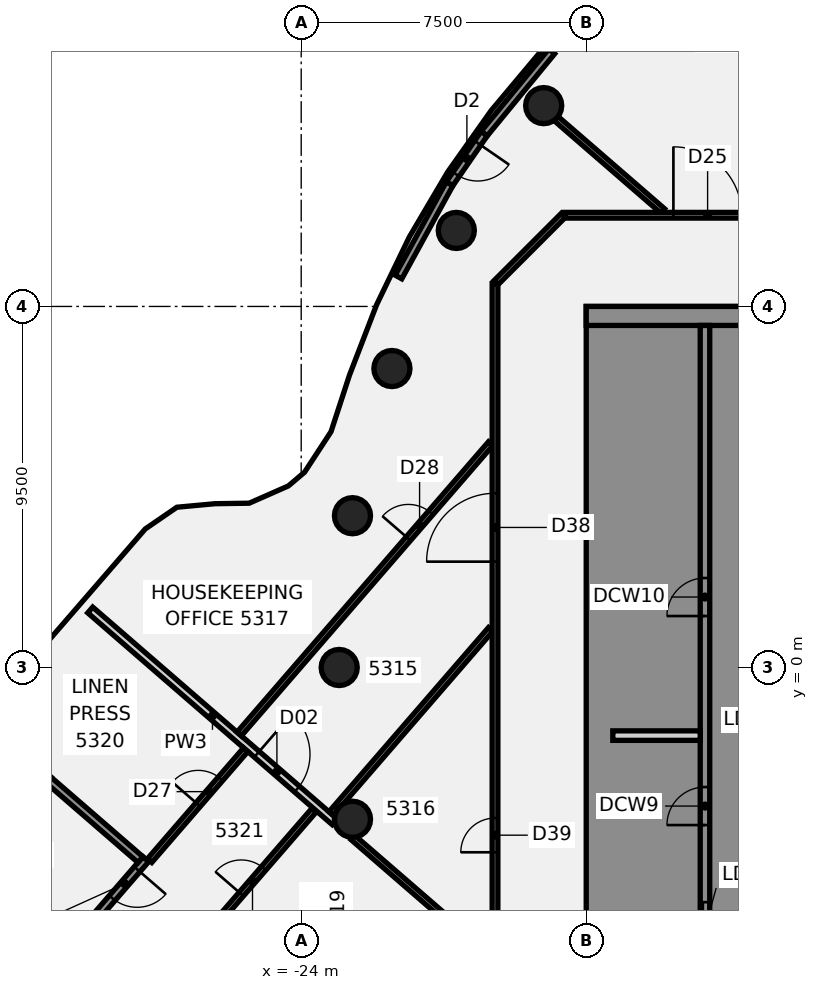
"""IFC4 building model, lengths in metres.
Left out: names, types, materials, properties, quantities, classifications, styles, units other than length and angle.
Written with IfcOpenShell. Run it as: python <this file> out.ifc"""

import sys

from ifc_helpers import new_model, si_unit, direction, frame, frame_2d, origin, origin_2d, place, context, subcontext, project, spatial, polyline, rectangle, circle, outline, extrude, element, fill, save


model = new_model("IFC4")
c1 = context("Model", 3, precision=1e-05, world=origin(), true_north=direction((0.0, 1.0)))
c2 = subcontext(c1, "Body", "Model", "MODEL_VIEW")
j1 = project(units=[si_unit("LENGTHUNIT", "METRE"), si_unit("PLANEANGLEUNIT", "RADIAN")], contexts=[c1])
p1 = place(None, origin())
s1 = spatial("IfcSite", under=j1, at=p1, CompositionType="ELEMENT")
p2 = place(p1, origin())
s2 = spatial("IfcBuilding", under=s1, at=p2, CompositionType="ELEMENT")
p3 = place(p2, frame((0.0, 0.0, 211.3)))
s3 = spatial("IfcBuildingStorey", under=s2, at=p3, CompositionType="ELEMENT", Elevation=211.3)
for number, where, z_axis, x_axis in (
    (1, (-17.619, 14.784, -0.14), (0.0, 0.0, 1.0), (1.0, 0.0, 0.0)),
    (2, (-19.919, 11.5, -0.14), (0.0, 0.0, 1.0), (1.0, 0.0, 0.0)),
    (3, (-21.613, 7.866, -0.14), (0.0, 0.0, 1.0), (1.0, 0.0, 0.0)),
    (4, (-22.651, 3.994, -0.14), (0.0, 0.0, 1.0), (1.0, 0.0, 0.0)),
    (5, (-23.0, 0.0, -0.14), (0.0, 0.0, 1.0), (1.0, 0.0, 0.0)),
    (6, (-22.651, -3.994, -0.14), (0.0, 0.0, 1.0), (1.0, 0.0, 0.0)),
):
    element("IfcColumn", number, at=place(p3, frame(where, z_axis=z_axis, x_axis=x_axis)), inside=s3, PredefinedType="COLUMN", context=c2, shape_type="SweptSolid", body=[
        extrude(circle(Radius=0.475, at=origin_2d()), origin(), (0.0, 0.0, 1.0), 3.56),
    ])
p4 = place(p3, frame((-29.552, 1.513, 0.0), z_axis=(0.0, 0.0, 1.0), x_axis=(0.755865087151, -0.65472740131, 0.0)))
e7 = element("IfcWall", 7, at=p4, inside=s3, PredefinedType="PARTITIONING", context=c2, shape_type="SweptSolid", body=[
    extrude(rectangle(XDim=8.511, YDim=0.2, at=frame_2d((4.256, 0.0))), origin(), (0.0, 0.0, 1.0), 2.82),
])
p5 = place(p4, frame((5.799, 0.0, 0.0)))
e8 = element("IfcOpeningElement", 8, at=p5, cuts=e7, PredefinedType="OPENING", context=c2, shape_type="SweptSolid", body=[
    extrude(rectangle(XDim=1.4, YDim=2.1, at=frame_2d((0.7, 1.05))), frame((0.0, 0.11, 0.0), z_axis=(0.0, -1.0, 0.0), x_axis=(1.0, 0.0, 0.0)), (0.0, 0.0, 1.0), 0.22),
])
p6 = place(p3, frame((-22.638, -4.476, 0.0), z_axis=(0.0, 0.0, 1.0), x_axis=(0.755838297059, -0.654758328468, 0.0)))
e9 = element("IfcWall", 9, at=p6, inside=s3, PredefinedType="PARTITIONING", context=c2, shape_type="SweptSolid", body=[
    extrude(rectangle(XDim=4.804, YDim=0.15, at=frame_2d((2.402, 0.0))), origin(), (0.0, 0.0, 1.0), 2.824),
])
p7 = place(p3, frame((-17.295, 14.446, 0.0), z_axis=(0.0, 0.0, 1.0), x_axis=(0.755890810331, -0.654697703415, 0.0)))
e10 = element("IfcWall", 10, at=p7, inside=s3, PredefinedType="PARTITIONING", context=c2, shape_type="SweptSolid", body=[
    extrude(rectangle(XDim=3.713, YDim=0.15, at=frame_2d((1.856, 0.0))), origin(), (0.0, 0.0, 1.0), 2.824),
])
p8 = place(p3, frame((-17.065, 11.9, 0.0), z_axis=(0.0, 0.0, 1.0), x_axis=(1.0, 0.0, 0.0)))
e11 = element("IfcWall", 11, at=p8, inside=s3, PredefinedType="PARTITIONING", context=c2, shape_type="SweptSolid", body=[
    extrude(rectangle(XDim=34.165, YDim=0.15, at=frame_2d((17.083, 0.0))), origin(), (0.0, 0.0, 1.0), 2.824),
])
p9 = place(p8, frame((24.284, 0.0, 0.0)))
e12 = element("IfcOpeningElement", 12, at=p9, cuts=e11, PredefinedType="OPENING", context=c2, shape_type="SweptSolid", body=[
    extrude(rectangle(XDim=1.8, YDim=2.1, at=frame_2d((0.9, 1.05))), frame((0.0, 0.085, 0.0), z_axis=(0.0, -1.0, 0.0), x_axis=(1.0, 0.0, 0.0)), (0.0, 0.0, 1.0), 0.17),
])
p10 = place(p8, frame((9.009, 0.0, 0.0)))
e13 = element("IfcOpeningElement", 13, at=p10, cuts=e11, PredefinedType="OPENING", context=c2, shape_type="SweptSolid", body=[
    extrude(rectangle(XDim=1.8, YDim=2.1, at=frame_2d((0.9, 1.05))), frame((0.0, 0.085, 0.0), z_axis=(0.0, -1.0, 0.0), x_axis=(1.0, 0.0, 0.0)), (0.0, 0.0, 1.0), 0.17),
])
p11 = place(p8, frame((29.321, 0.0, 0.0)))
e14 = element("IfcOpeningElement", 14, at=p11, cuts=e11, PredefinedType="OPENING", context=c2, shape_type="SweptSolid", body=[
    extrude(rectangle(XDim=0.9, YDim=2.1, at=frame_2d((0.45, 1.05))), frame((0.0, 0.085, 0.0), z_axis=(0.0, -1.0, 0.0), x_axis=(1.0, 0.0, 0.0)), (0.0, 0.0, 1.0), 0.17),
])
p12 = place(p8, frame((2.859, 0.0, 0.0)))
e15 = element("IfcOpeningElement", 15, at=p12, cuts=e11, PredefinedType="OPENING", context=c2, shape_type="SweptSolid", body=[
    extrude(rectangle(XDim=1.8, YDim=2.1, at=frame_2d((0.9, 1.05))), frame((0.0, 0.085, 0.0), z_axis=(0.0, -1.0, 0.0), x_axis=(1.0, 0.0, 0.0)), (0.0, 0.0, 1.0), 0.17),
])
p13 = place(p3, frame((-18.872, 10.128, 0.0), z_axis=(0.0, 0.0, 1.0), x_axis=(0.707106781187, 0.707106781187, 0.0)))
e16 = element("IfcWall", 16, at=p13, inside=s3, PredefinedType="PARTITIONING", context=c2, shape_type="SweptSolid", body=[
    extrude(rectangle(XDim=2.505, YDim=0.15, at=frame_2d((1.253, 0.0))), origin(), (0.0, 0.0, 1.0), 2.824),
])
p14 = place(p3, frame((-29.421, -10.4, 0.0), z_axis=(0.0, 0.0, 1.0), x_axis=(0.65486716171, 0.755744004617, 0.0)))
e17 = element("IfcWall", 17, at=p14, inside=s3, PredefinedType="PARTITIONING", context=c2, shape_type="SweptSolid", body=[
    extrude(rectangle(XDim=8.8, YDim=0.15, at=frame_2d((4.4, 0.0))), origin(), (0.0, 0.0, 1.0), 2.72),
])
p15 = place(p14, frame((5.871, 0.0, 0.0)))
e18 = element("IfcOpeningElement", 18, at=p15, cuts=e17, PredefinedType="OPENING", context=c2, shape_type="SweptSolid", body=[
    extrude(rectangle(XDim=0.9, YDim=2.1, at=frame_2d((0.45, 1.05))), frame((0.0, 0.085, 0.0), z_axis=(0.0, -1.0, 0.0), x_axis=(1.0, 0.0, 0.0)), (0.0, 0.0, 1.0), 0.17),
])
p16 = place(p3, frame((-27.988, -5.081, 0.0), z_axis=(0.0, 0.0, 1.0), x_axis=(0.654668065935, 0.755916479146, 0.0)))
e19 = element("IfcWall", 19, at=p16, inside=s3, PredefinedType="PARTITIONING", context=c2, shape_type="SweptSolid", body=[
    extrude(rectangle(XDim=3.861, YDim=0.15, at=frame_2d((1.93, 0.0))), origin(), (0.0, 0.0, 1.0), 2.72),
])
p17 = place(p16, frame((1.95, 0.0, 0.0)))
e20 = element("IfcOpeningElement", 20, at=p17, cuts=e19, PredefinedType="OPENING", context=c2, shape_type="SweptSolid", body=[
    extrude(rectangle(XDim=0.9, YDim=2.1, at=frame_2d((0.45, 1.05))), frame((0.0, 0.085, 0.0), z_axis=(0.0, -1.0, 0.0), x_axis=(1.0, 0.0, 0.0)), (0.0, 0.0, 1.0), 0.17),
])
p18 = place(p3, frame((-25.632, -1.75, 0.0), z_axis=(0.0, 0.0, 1.0), x_axis=(0.65467576909, 0.755909807693, 0.0)))
e21 = element("IfcWall", 21, at=p18, inside=s3, PredefinedType="PARTITIONING", context=c2, shape_type="SweptSolid", body=[
    extrude(rectangle(XDim=10.107, YDim=0.15, at=frame_2d((5.054, 0.0))), origin(), (0.0, 0.0, 1.0), 2.824),
])
p19 = place(p18, frame((6.8, 0.0, 0.0)))
e22 = element("IfcOpeningElement", 22, at=p19, cuts=e21, PredefinedType="OPENING", context=c2, shape_type="SweptSolid", body=[
    extrude(rectangle(XDim=0.9, YDim=2.1, at=frame_2d((0.45, 1.05))), frame((0.0, 0.085, 0.0), z_axis=(0.0, -1.0, 0.0), x_axis=(1.0, 0.0, 0.0)), (0.0, 0.0, 1.0), 0.17),
])
p20 = place(p3, frame((-23.212, -3.844, 0.0), z_axis=(0.0, 0.0, 1.0), x_axis=(0.654652183263, 0.755930234181, 0.0)))
e23 = element("IfcWall", 23, at=p20, inside=s3, PredefinedType="PARTITIONING", context=c2, shape_type="SweptSolid", body=[
    extrude(rectangle(XDim=6.412, YDim=0.15, at=frame_2d((3.206, 0.0))), origin(), (0.0, 0.0, 1.0), 2.82),
])
p21 = place(p3, frame((-18.9, -10.1, 0.0), z_axis=(0.0, 0.0, 1.0), x_axis=(0.0, 1.0, 0.0)))
e24 = element("IfcWall", 24, at=p21, inside=s3, PredefinedType="PARTITIONING", context=c2, shape_type="SweptSolid", body=[
    extrude(rectangle(XDim=20.2, YDim=0.15, at=frame_2d((10.1, 0.0))), origin(), (0.0, 0.0, 1.0), 2.824),
])
p22 = place(p21, frame((12.885, 0.0, 0.0)))
e25 = element("IfcOpeningElement", 25, at=p22, cuts=e24, PredefinedType="OPENING", context=c2, shape_type="SweptSolid", body=[
    extrude(rectangle(XDim=1.8, YDim=2.1, at=frame_2d((0.9, 1.05))), frame((0.0, 0.085, 0.0), z_axis=(0.0, -1.0, 0.0), x_axis=(1.0, 0.0, 0.0)), (0.0, 0.0, 1.0), 0.17),
])
p23 = place(p21, frame((5.238, 0.0, 0.0)))
e26 = element("IfcOpeningElement", 26, at=p23, cuts=e24, PredefinedType="OPENING", context=c2, shape_type="SweptSolid", body=[
    extrude(rectangle(XDim=0.9, YDim=2.1, at=frame_2d((0.45, 1.05))), frame((0.0, 0.085, 0.0), z_axis=(0.0, -1.0, 0.0), x_axis=(1.0, 0.0, 0.0)), (0.0, 0.0, 1.0), 0.17),
])
p24 = place(p3, frame((-17.408, 16.211, 0.0), z_axis=(0.0, 0.0, 1.0), x_axis=(-0.634912325122, -0.772584195676, 0.0)))
e27 = element("IfcWall", 27, at=p24, inside=s3, PredefinedType="SOLIDWALL", context=c2, shape_type="SweptSolid", body=[
    extrude(rectangle(XDim=2.8, YDim=0.2, at=frame_2d((1.4, 0.0))), origin(), (0.0, 0.0, 1.0), 3.42),
])
p25 = place(p3, frame((-20.094, 12.731, 0.0), z_axis=(0.0, 0.0, 1.0), x_axis=(-0.480854230323, -0.87680055268, 0.0)))
e28 = element("IfcWall", 28, at=p25, inside=s3, PredefinedType="SOLIDWALL", context=c2, shape_type="SweptSolid", body=[
    extrude(rectangle(XDim=2.801, YDim=0.2, at=frame_2d((1.4, 0.0))), origin(), (0.0, 0.0, 1.0), 3.42),
])
p26 = place(p3, frame((-19.186, 14.047, 0.0), z_axis=(0.0, 0.0, 1.0), x_axis=(-0.567772198578, -0.823185720552, 0.0)))
e29 = element("IfcWall", 29, at=p26, inside=s3, PredefinedType="SOLIDWALL", context=c2, shape_type="SweptSolid", body=[
    extrude(rectangle(XDim=1.599, YDim=0.2, at=frame_2d((0.8, 0.0))), origin(), (0.0, 0.0, 1.0), 3.42),
])
p27 = place(p26, frame((0.3, 0.0, 0.0)))
e30 = element("IfcOpeningElement", 30, at=p27, cuts=e29, PredefinedType="OPENING", context=c2, shape_type="SweptSolid", body=[
    extrude(rectangle(XDim=1.0, YDim=2.4, at=frame_2d((0.5, 1.2))), frame((0.0, 0.11, 0.0), z_axis=(0.0, -1.0, 0.0), x_axis=(1.0, 0.0, 0.0)), (0.0, 0.0, 1.0), 0.22),
])
p28 = place(p3, origin())
e31 = element("IfcWall", 31, at=p28, inside=s3, PredefinedType="SHEAR", context=c2, shape_type="SweptSolid", body=[
    extrude(outline(polyline([(-13.5, -8.125), (-16.0, -8.125), (-16.0, -5.625), (-13.5, -5.625), (-13.5, -5.375), (-16.0, -5.375), (-16.0, 5.375), (-13.5, 5.375), (-13.5, 5.625), (-16.0, 5.625), (-16.0, 8.125), (-13.5, 8.125), (-13.5, 9.0), (-16.0, 9.0), (-16.5, 9.0), (-16.5, -9.0), (-16.0, -9.0), (-13.5, -9.0), (-13.5, -8.125)])), origin(), (0.0, 0.0, 1.0), 3.42),
])
p29 = place(p3, frame((-16.5, 9.25, 0.0), z_axis=(0.0, 0.0, 1.0), x_axis=(1.0, 0.0, 0.0)))
e32 = element("IfcWall", 32, at=p29, inside=s3, PredefinedType="SHEAR", context=c2, shape_type="SweptSolid", body=[
    extrude(rectangle(XDim=13.0, YDim=0.5, at=frame_2d((6.5, 0.0))), origin(), (0.0, 0.0, 1.0), 3.42),
])
p30 = place(p3, frame((-13.375, -9.0, 0.0), z_axis=(0.0, 0.0, 1.0), x_axis=(0.0, 1.0, 0.0)))
e33 = element("IfcWall", 33, at=p30, inside=s3, PredefinedType="SHEAR", context=c2, shape_type="SweptSolid", body=[
    extrude(rectangle(XDim=18.0, YDim=0.25, at=frame_2d((9.0, 0.0))), origin(), (0.0, 0.0, 1.0), 3.42),
])
p31 = place(p30, frame((1.425, 0.0, 0.0)))
e34 = element("IfcOpeningElement", 34, at=p31, cuts=e33, PredefinedType="OPENING", context=c2, shape_type="SweptSolid", body=[
    extrude(rectangle(XDim=1.4, YDim=2.1, at=frame_2d((0.7, 1.05))), frame((0.0, 0.135, 0.0), z_axis=(0.0, -1.0, 0.0), x_axis=(1.0, 0.0, 0.0)), (0.0, 0.0, 1.0), 0.27),
])
p32 = place(p30, frame((4.854, 0.0, 0.0)))
e35 = element("IfcOpeningElement", 35, at=p32, cuts=e33, PredefinedType="OPENING", context=c2, shape_type="SweptSolid", body=[
    extrude(rectangle(XDim=1.0, YDim=2.1, at=frame_2d((0.5, 1.05))), frame((0.0, 0.135, 0.0), z_axis=(0.0, -1.0, 0.0), x_axis=(1.0, 0.0, 0.0)), (0.0, 0.0, 1.0), 0.27),
])
p33 = place(p30, frame((10.354, 0.0, 0.0)))
e36 = element("IfcOpeningElement", 36, at=p33, cuts=e33, PredefinedType="OPENING", context=c2, shape_type="SweptSolid", body=[
    extrude(rectangle(XDim=1.0, YDim=2.1, at=frame_2d((0.5, 1.05))), frame((0.0, 0.135, 0.0), z_axis=(0.0, -1.0, 0.0), x_axis=(1.0, 0.0, 0.0)), (0.0, 0.0, 1.0), 0.27),
])
p34 = place(p3, frame((-15.8, -1.792, 0.0), z_axis=(0.0, 0.0, 1.0), x_axis=(1.0, 0.0, 0.0)))
e37 = element("IfcWall", 37, at=p34, inside=s3, PredefinedType="PARTITIONING", context=c2, shape_type="SweptSolid", body=[
    extrude(rectangle(XDim=2.3, YDim=0.25, at=frame_2d((1.15, 0.0))), origin(), (0.0, 0.0, 1.0), 3.42),
])
p35 = place(p3, frame((-28.089, -5.045, -0.14), z_axis=(0.0, 0.0, 1.0), x_axis=(-0.654678012674, -0.755907864572, 0.0)))
e38 = element("IfcWall", 38, at=p35, inside=s3, PredefinedType="SHEAR", context=c2, shape_type="SweptSolid", body=[
    extrude(rectangle(XDim=6.7, YDim=0.2, at=frame_2d((3.35, 0.0))), origin(), (0.0, 0.0, 1.0), 2.86),
])
p36 = place(p35, frame((0.35, 0.0, 0.0)))
e39 = element("IfcOpeningElement", 39, at=p36, cuts=e38, PredefinedType="OPENING", context=c2, shape_type="SweptSolid", body=[
    extrude(rectangle(XDim=1.0, YDim=2.1, at=frame_2d((0.5, 1.05))), frame((0.0, 0.11, 0.0), z_axis=(0.0, -1.0, 0.0), x_axis=(1.0, 0.0, 0.0)), (0.0, 0.0, 1.0), 0.22),
])
p37 = place(p3, frame((-30.649, -2.96, -0.14), z_axis=(0.0, 0.0, 1.0), x_axis=(0.755913077251, -0.654671993933, 0.0)))
e40 = element("IfcWall", 40, at=p37, inside=s3, PredefinedType="SHEAR", context=c2, shape_type="SweptSolid", body=[
    extrude(rectangle(XDim=3.2, YDim=0.2, at=frame_2d((1.6, 0.0))), origin(), (0.0, 0.0, 1.0), 2.86),
])
p38 = place(p5, origin())
e41 = element("IfcDoor", 41, at=p38, inside=s3, OperationType="DOUBLE_DOOR_SINGLE_SWING", PredefinedType="DOOR", context=c2, shape_type="SweptSolid", body=[
    extrude(rectangle(XDim=1.4, YDim=2.1, at=frame_2d((0.7, 1.05))), frame((0.0, 0.025, 0.0), z_axis=(0.0, -1.0, 0.0), x_axis=(1.0, 0.0, 0.0)), (0.0, 0.0, 1.0), 0.05),
])
fill(e8, e41)
p39 = place(p12, origin())
e42 = element("IfcDoor", 42, at=p39, inside=s3, OperationType="DOUBLE_DOOR_SINGLE_SWING", PredefinedType="DOOR", context=c2, shape_type="SweptSolid", body=[
    extrude(rectangle(XDim=1.8, YDim=2.1, at=frame_2d((0.9, 1.05))), frame((0.0, 0.025, 0.0), z_axis=(0.0, -1.0, 0.0), x_axis=(1.0, 0.0, 0.0)), (0.0, 0.0, 1.0), 0.05),
])
fill(e15, e42)
p40 = place(p15, frame((0.9, 0.0, 0.0), z_axis=(0.0, 0.0, 1.0), x_axis=(-1.0, 0.0, 0.0)))
e43 = element("IfcDoor", 43, at=p40, inside=s3, OperationType="SINGLE_SWING_RIGHT", PredefinedType="DOOR", context=c2, shape_type="SweptSolid", body=[
    extrude(rectangle(XDim=0.9, YDim=2.1, at=frame_2d((0.45, 1.05))), frame((0.0, 0.025, 0.0), z_axis=(0.0, -1.0, 0.0), x_axis=(1.0, 0.0, 0.0)), (0.0, 0.0, 1.0), 0.05),
])
fill(e18, e43)
p41 = place(p17, origin())
e44 = element("IfcDoor", 44, at=p41, inside=s3, OperationType="SINGLE_SWING_LEFT", PredefinedType="DOOR", context=c2, shape_type="SweptSolid", body=[
    extrude(rectangle(XDim=0.9, YDim=2.1, at=frame_2d((0.45, 1.05))), frame((0.0, 0.025, 0.0), z_axis=(0.0, -1.0, 0.0), x_axis=(1.0, 0.0, 0.0)), (0.0, 0.0, 1.0), 0.05),
])
fill(e20, e44)
p42 = place(p19, origin())
e45 = element("IfcDoor", 45, at=p42, inside=s3, OperationType="SINGLE_SWING_LEFT", PredefinedType="DOOR", context=c2, shape_type="SweptSolid", body=[
    extrude(rectangle(XDim=0.9, YDim=2.1, at=frame_2d((0.45, 1.05))), frame((0.0, 0.025, 0.0), z_axis=(0.0, -1.0, 0.0), x_axis=(1.0, 0.0, 0.0)), (0.0, 0.0, 1.0), 0.05),
])
fill(e22, e45)
p43 = place(p22, frame((1.8, 0.0, 0.0), z_axis=(0.0, 0.0, 1.0), x_axis=(-1.0, 0.0, 0.0)))
e46 = element("IfcDoor", 46, at=p43, inside=s3, OperationType="DOUBLE_DOOR_SINGLE_SWING", PredefinedType="DOOR", context=c2, shape_type="SweptSolid", body=[
    extrude(rectangle(XDim=1.8, YDim=2.1, at=frame_2d((0.9, 1.05))), frame((0.0, 0.025, 0.0), z_axis=(0.0, -1.0, 0.0), x_axis=(1.0, 0.0, 0.0)), (0.0, 0.0, 1.0), 0.05),
])
fill(e25, e46)
p44 = place(p23, origin())
e47 = element("IfcDoor", 47, at=p44, inside=s3, OperationType="SINGLE_SWING_RIGHT", PredefinedType="DOOR", context=c2, shape_type="SweptSolid", body=[
    extrude(rectangle(XDim=0.9, YDim=2.1, at=frame_2d((0.45, 1.05))), frame((0.0, 0.025, 0.0), z_axis=(0.0, -1.0, 0.0), x_axis=(1.0, 0.0, 0.0)), (0.0, 0.0, 1.0), 0.05),
])
fill(e26, e47)
p45 = place(p27, origin())
e48 = element("IfcDoor", 48, at=p45, inside=s3, OperationType="SINGLE_SWING_LEFT", PredefinedType="DOOR", context=c2, shape_type="SweptSolid", body=[
    extrude(rectangle(XDim=1.0, YDim=2.4, at=frame_2d((0.5, 1.2))), frame((0.0, 0.025, 0.0), z_axis=(0.0, -1.0, 0.0), x_axis=(1.0, 0.0, 0.0)), (0.0, 0.0, 1.0), 0.05),
])
fill(e30, e48)
p46 = place(p31, origin())
e49 = element("IfcDoor", 49, at=p46, inside=s3, OperationType="SLIDING_TO_LEFT", PredefinedType="DOOR", context=c2, shape_type="SweptSolid", body=[
    extrude(rectangle(XDim=1.4, YDim=2.1, at=frame_2d((0.7, 1.05))), frame((0.0, 0.025, 0.0), z_axis=(0.0, -1.0, 0.0), x_axis=(1.0, 0.0, 0.0)), (0.0, 0.0, 1.0), 0.05),
])
fill(e34, e49)
p47 = place(p32, origin())
e50 = element("IfcDoor", 50, at=p47, inside=s3, OperationType="SINGLE_SWING_LEFT", PredefinedType="DOOR", context=c2, shape_type="SweptSolid", body=[
    extrude(rectangle(XDim=1.0, YDim=2.1, at=frame_2d((0.5, 1.05))), frame((0.0, 0.025, 0.0), z_axis=(0.0, -1.0, 0.0), x_axis=(1.0, 0.0, 0.0)), (0.0, 0.0, 1.0), 0.05),
])
fill(e35, e50)
p48 = place(p33, origin())
e51 = element("IfcDoor", 51, at=p48, inside=s3, OperationType="SINGLE_SWING_LEFT", PredefinedType="DOOR", context=c2, shape_type="SweptSolid", body=[
    extrude(rectangle(XDim=1.0, YDim=2.1, at=frame_2d((0.5, 1.05))), frame((0.0, 0.025, 0.0), z_axis=(0.0, -1.0, 0.0), x_axis=(1.0, 0.0, 0.0)), (0.0, 0.0, 1.0), 0.05),
])
fill(e36, e51)
p49 = place(p36, origin())
e52 = element("IfcDoor", 52, at=p49, inside=s3, OperationType="SINGLE_SWING_LEFT", PredefinedType="DOOR", context=c2, shape_type="SweptSolid", body=[
    extrude(rectangle(XDim=1.0, YDim=2.1, at=frame_2d((0.5, 1.05))), frame((0.0, 0.025, 0.0), z_axis=(0.0, -1.0, 0.0), x_axis=(1.0, 0.0, 0.0)), (0.0, 0.0, 1.0), 0.05),
])
fill(e39, e52)
save(model, sys.argv[1])
